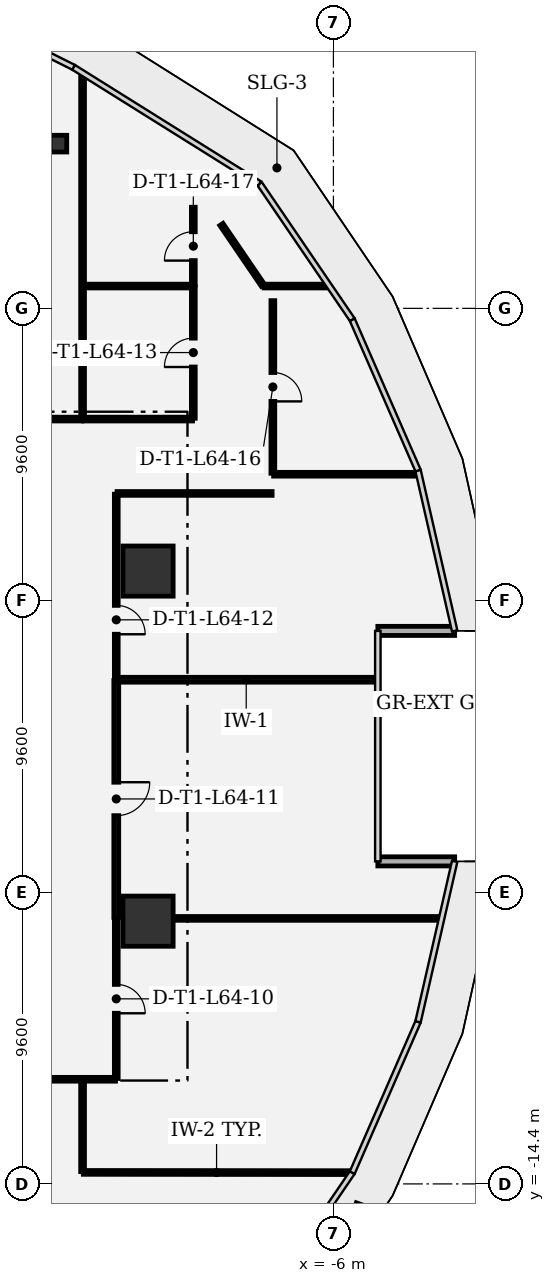
"""IFC4 building model, lengths in metres.
Left out: names, types, materials, properties, quantities, classifications, styles, units other than length and angle.
Written with IfcOpenShell. Run it as: python <this file> out.ifc"""

import sys

from ifc_helpers import new_model, si_unit, direction, frame, frame_2d, origin, origin_2d, place, context, subcontext, project, spatial, rectangle, extrude, element, fill, save


model = new_model("IFC4")
c1 = context("Model", 3, precision=1e-05, world=origin(), true_north=direction((0.0, 1.0)))
c2 = subcontext(c1, "Body", "Model", "MODEL_VIEW")
j1 = project(units=[si_unit("LENGTHUNIT", "METRE"), si_unit("PLANEANGLEUNIT", "RADIAN")], contexts=[c1])
p1 = place(None, origin())
s1 = spatial("IfcSite", under=j1, at=p1, CompositionType="ELEMENT")
p2 = place(p1, origin())
s2 = spatial("IfcBuilding", under=s1, at=p2, CompositionType="ELEMENT")
p3 = place(p2, frame((0.0, 0.0, 276.6)))
s3 = spatial("IfcBuildingStorey", under=s2, at=p3, CompositionType="ELEMENT", Elevation=276.6)
for number, where, z_axis, x_axis in (
    (1, (-12.097, -5.758, 0.0), (0.0, 0.0, 1.0), (1.0, 0.0, 0.0)),
    (2, (-12.097, 5.758, 0.0), (0.0, 0.0, 1.0), (1.0, 0.0, 0.0)),
):
    element("IfcColumn", number, at=place(p3, frame(where, z_axis=z_axis, x_axis=x_axis)), inside=s3, PredefinedType="COLUMN", context=c2, shape_type="SweptSolid", body=[
        extrude(rectangle(XDim=1.65, YDim=1.65, at=origin_2d()), origin(), (0.0, 0.0, 1.0), 4.2),
    ])
p4 = place(p3, frame((-15.046, 19.818, 0.0), z_axis=(0.0, 0.0, 1.0), x_axis=(1.0, 0.0, 0.0)))
e3 = element("IfcColumn", 3, at=p4, inside=s3, PredefinedType="COLUMN", context=c2, shape_type="SweptSolid", body=[
    extrude(rectangle(XDim=0.55, YDim=0.55, at=origin_2d()), origin(), (0.0, 0.0, 1.0), 4.2),
])
for number, where, z_axis, x_axis in (
    (4, (-2.011, -3.791, 0.0), (0.0, 0.0, 1.0), (-1.0, 0.0, 0.0)),
    (5, (-4.539, 3.791, 0.0), (0.0, 0.0, 1.0), (1.0, 0.0, 0.0)),
):
    element("IfcWall", number, at=place(p3, frame(where, z_axis=z_axis, x_axis=x_axis)), inside=s3, PredefinedType="SOLIDWALL", context=c2, shape_type="SweptSolid", body=[
        extrude(rectangle(XDim=2.527, YDim=0.3, at=frame_2d((1.264, 0.0))), origin(), (0.0, 0.0, 1.0), 3.91),
    ])
p5 = place(p3, frame((-14.225, -14.021, 0.0), z_axis=(0.0, 0.0, 1.0), x_axis=(0.999999627134, -0.000863557536, 0.0)))
e6 = element("IfcWall", 6, at=p5, inside=s3, PredefinedType="PARTITIONING", context=c2, shape_type="SweptSolid", body=[
    extrude(rectangle(XDim=8.764, YDim=0.125, at=frame_2d((4.382, 0.0))), origin(), (0.0, 0.0, 1.0), 3.91),
])
p6 = place(p3, frame((-14.25, -13.997, 0.0), z_axis=(0.0, 0.0, 1.0), x_axis=(0.0, 1.0, 0.0)))
e7 = element("IfcWall", 7, at=p6, inside=s3, PredefinedType="PARTITIONING", context=c2, shape_type="SweptSolid", body=[
    extrude(rectangle(XDim=3.014, YDim=0.125, at=frame_2d((1.507, 0.0))), origin(), (0.0, 0.0, 1.0), 3.13),
])
p7 = place(p3, frame((-38.384, -10.958, 0.0), z_axis=(0.0, 0.0, 1.0), x_axis=(1.0, 0.0, 0.0)))
e8 = element("IfcWall", 8, at=p7, inside=s3, PredefinedType="PARTITIONING", context=c2, shape_type="SweptSolid", body=[
    extrude(rectangle(XDim=24.109, YDim=0.125, at=frame_2d((12.055, 0.0))), origin(), (0.0, 0.0, 1.0), 3.13),
])
p8 = place(p7, frame((11.58, 0.0, 0.0)))
e9 = element("IfcOpeningElement", 9, at=p8, cuts=e8, PredefinedType="OPENING", context=c2, shape_type="SweptSolid", body=[
    extrude(rectangle(XDim=0.95, YDim=2.15, at=frame_2d((0.475, 1.075))), frame((0.0, 0.073, 0.0), z_axis=(0.0, -1.0, 0.0), x_axis=(1.0, 0.0, 0.0)), (0.0, 0.0, 1.0), 0.145),
])
p9 = place(p3, frame((-14.275, 10.758, 0.0), z_axis=(0.0, 0.0, 1.0), x_axis=(-1.0, 0.0, 0.0)))
e10 = element("IfcWall", 10, at=p9, inside=s3, PredefinedType="PARTITIONING", context=c2, shape_type="SweptSolid", body=[
    extrude(rectangle(XDim=23.473, YDim=0.125, at=frame_2d((11.736, 0.0))), origin(), (0.0, 0.0, 1.0), 3.13),
])
p10 = place(p3, frame((-14.25, 10.783, 0.0), z_axis=(0.0, 0.0, 1.0), x_axis=(0.0, 1.0, 0.0)))
e11 = element("IfcWall", 11, at=p10, inside=s3, PredefinedType="PARTITIONING", context=c2, shape_type="SweptSolid", body=[
    extrude(rectangle(XDim=11.28, YDim=0.125, at=frame_2d((5.64, 0.0))), origin(), (0.0, 0.0, 1.0), 3.13),
])
p11 = place(p3, frame((-2.52, -5.667, 0.0), z_axis=(0.0, 0.0, 1.0), x_axis=(-1.0, 0.0, 0.0)))
e12 = element("IfcWall", 12, at=p11, inside=s3, PredefinedType="PARTITIONING", context=c2, shape_type="SweptSolid", body=[
    extrude(rectangle(XDim=8.687, YDim=0.125, at=frame_2d((4.344, 0.0))), origin(), (0.0, 0.0, 1.0), 3.91),
])
p12 = place(p3, frame((-13.142, -5.692, 0.0), z_axis=(0.0, 0.0, 1.0), x_axis=(0.0, -1.0, 0.0)))
e13 = element("IfcWall", 13, at=p12, inside=s3, PredefinedType="PARTITIONING", context=c2, shape_type="SweptSolid", body=[
    extrude(rectangle(XDim=5.241, YDim=0.125, at=frame_2d((2.621, 0.0))), origin(), (0.0, 0.0, 1.0), 3.13),
])
p13 = place(p12, frame((2.146, 0.0, 0.0)))
e14 = element("IfcOpeningElement", 14, at=p13, cuts=e13, PredefinedType="OPENING", context=c2, shape_type="SweptSolid", body=[
    extrude(rectangle(XDim=0.95, YDim=2.15, at=frame_2d((0.475, 1.075))), frame((0.0, 0.073, 0.0), z_axis=(0.0, -1.0, 0.0), x_axis=(1.0, 0.0, 0.0)), (0.0, 0.0, 1.0), 0.145),
])
p14 = place(p3, frame((-14.217, -10.958, 0.0), z_axis=(0.0, 0.0, 1.0), x_axis=(1.0, 0.0, 0.0)))
e15 = element("IfcWall", 15, at=p14, inside=s3, PredefinedType="PARTITIONING", context=c2, shape_type="SweptSolid", body=[
    extrude(rectangle(XDim=1.05, YDim=0.125, at=frame_2d((0.525, 0.0))), origin(), (0.0, 0.0, 1.0), 3.91),
])
p15 = place(p3, frame((-4.619, 2.184, 0.0), z_axis=(0.0, 0.0, 1.0), x_axis=(-1.0, 0.0, 0.0)))
e16 = element("IfcWall", 16, at=p15, inside=s3, PredefinedType="PARTITIONING", context=c2, shape_type="SweptSolid", body=[
    extrude(rectangle(XDim=8.499, YDim=0.16, at=frame_2d((4.249, 0.0))), origin(), (0.0, 0.0, 1.0), 3.91),
])
p16 = place(p3, frame((-13.142, 2.159, 0.0), z_axis=(0.0, 0.0, 1.0), x_axis=(0.0, -1.0, 0.0)))
e17 = element("IfcWall", 17, at=p16, inside=s3, PredefinedType="PARTITIONING", context=c2, shape_type="SweptSolid", body=[
    extrude(rectangle(XDim=7.793, YDim=0.16, at=frame_2d((3.896, 0.0))), origin(), (0.0, 0.0, 1.0), 3.91),
])
p17 = place(p16, frame((3.346, 0.0, 0.0)))
e18 = element("IfcOpeningElement", 18, at=p17, cuts=e17, PredefinedType="OPENING", context=c2, shape_type="SweptSolid", body=[
    extrude(rectangle(XDim=1.1, YDim=2.15, at=frame_2d((0.55, 1.075))), frame((0.0, 0.09, 0.0), z_axis=(0.0, -1.0, 0.0), x_axis=(1.0, 0.0, 0.0)), (0.0, 0.0, 1.0), 0.18),
])
p18 = place(p3, frame((-3.268, 8.943, 0.0), z_axis=(0.0, 0.0, 1.0), x_axis=(-1.0, 0.0, 0.0)))
e19 = element("IfcWall", 19, at=p18, inside=s3, PredefinedType="PARTITIONING", context=c2, shape_type="SweptSolid", body=[
    extrude(rectangle(XDim=4.699, YDim=0.125, at=frame_2d((2.349, 0.0))), origin(), (0.0, 0.0, 1.0), 3.91),
])
p19 = place(p3, frame((-8.017, 8.312, 0.0), z_axis=(0.0, 0.0, 1.0), x_axis=(-1.0, 0.0, 0.0)))
e20 = element("IfcWall", 20, at=p19, inside=s3, PredefinedType="PARTITIONING", context=c2, shape_type="SweptSolid", body=[
    extrude(rectangle(XDim=5.1, YDim=0.125, at=frame_2d((2.55, 0.0))), origin(), (0.0, 0.0, 1.0), 3.91),
])
p20 = place(p3, frame((-13.142, 8.287, 0.0), z_axis=(0.0, 0.0, 1.0), x_axis=(0.0, -1.0, 0.0)))
e21 = element("IfcWall", 21, at=p20, inside=s3, PredefinedType="PARTITIONING", context=c2, shape_type="SweptSolid", body=[
    extrude(rectangle(XDim=6.07, YDim=0.125, at=frame_2d((3.035, 0.0))), origin(), (0.0, 0.0, 1.0), 3.13),
])
p21 = place(p20, frame((3.657, 0.0, 0.0)))
e22 = element("IfcOpeningElement", 22, at=p21, cuts=e21, PredefinedType="OPENING", context=c2, shape_type="SweptSolid", body=[
    extrude(rectangle(XDim=0.95, YDim=2.15, at=frame_2d((0.475, 1.075))), frame((0.0, 0.073, 0.0), z_axis=(0.0, -1.0, 0.0), x_axis=(1.0, 0.0, 0.0)), (0.0, 0.0, 1.0), 0.145),
])
p22 = place(p3, frame((-6.214, 15.134, 0.0), z_axis=(0.0, 0.0, 1.0), x_axis=(-1.0, 0.0, 0.0)))
e23 = element("IfcWall", 23, at=p22, inside=s3, PredefinedType="PARTITIONING", context=c2, shape_type="SweptSolid", body=[
    extrude(rectangle(XDim=2.064, YDim=0.125, at=frame_2d((1.032, 0.0))), origin(), (0.0, 0.0, 1.0), 3.91),
])
p23 = place(p3, frame((-7.992, 14.653, 0.0), z_axis=(0.0, 0.0, 1.0), x_axis=(0.0, -1.0, 0.0)))
e24 = element("IfcWall", 24, at=p23, inside=s3, PredefinedType="PARTITIONING", context=c2, shape_type="SweptSolid", body=[
    extrude(rectangle(XDim=5.677, YDim=0.125, at=frame_2d((2.838, 0.0))), origin(), (0.0, 0.0, 1.0), 3.91),
])
p24 = place(p23, frame((2.363, 0.0, 0.0)))
e25 = element("IfcOpeningElement", 25, at=p24, cuts=e24, PredefinedType="OPENING", context=c2, shape_type="SweptSolid", body=[
    extrude(rectangle(XDim=0.95, YDim=2.15, at=frame_2d((0.475, 1.075))), frame((0.0, 0.073, 0.0), z_axis=(0.0, -1.0, 0.0), x_axis=(1.0, 0.0, 0.0)), (0.0, 0.0, 1.0), 0.145),
])
p25 = place(p3, frame((-14.217, 10.758, 0.0), z_axis=(0.0, 0.0, 1.0), x_axis=(1.0, 0.0, 0.0)))
e26 = element("IfcWall", 26, at=p25, inside=s3, PredefinedType="PARTITIONING", context=c2, shape_type="SweptSolid", body=[
    extrude(rectangle(XDim=3.584, YDim=0.125, at=frame_2d((1.792, 0.0))), origin(), (0.0, 0.0, 1.0), 3.91),
])
p26 = place(p3, frame((-10.608, 10.783, 0.0), z_axis=(0.0, 0.0, 1.0), x_axis=(0.0, 1.0, 0.0)))
e27 = element("IfcWall", 27, at=p26, inside=s3, PredefinedType="PARTITIONING", context=c2, shape_type="SweptSolid", body=[
    extrude(rectangle(XDim=4.325, YDim=0.125, at=frame_2d((2.163, 0.0))), origin(), (0.0, 0.0, 1.0), 3.91),
])
p27 = place(p26, frame((1.688, 0.0, 0.0)))
e28 = element("IfcOpeningElement", 28, at=p27, cuts=e27, PredefinedType="OPENING", context=c2, shape_type="SweptSolid", body=[
    extrude(rectangle(XDim=0.95, YDim=2.15, at=frame_2d((0.475, 1.075))), frame((0.0, 0.073, 0.0), z_axis=(0.0, -1.0, 0.0), x_axis=(1.0, 0.0, 0.0)), (0.0, 0.0, 1.0), 0.145),
])
p28 = place(p3, frame((-10.633, 15.134, 0.0), z_axis=(0.0, 0.0, 1.0), x_axis=(-1.0, 0.0, 0.0)))
e29 = element("IfcWall", 29, at=p28, inside=s3, PredefinedType="PARTITIONING", context=c2, shape_type="SweptSolid", body=[
    extrude(rectangle(XDim=3.507, YDim=0.125, at=frame_2d((1.753, 0.0))), origin(), (0.0, 0.0, 1.0), 3.91),
])
p29 = place(p3, frame((-10.608, 15.167, 0.0), z_axis=(0.0, 0.0, 1.0), x_axis=(0.0, 1.0, 0.0)))
e30 = element("IfcWall", 30, at=p29, inside=s3, PredefinedType="PARTITIONING", context=c2, shape_type="SweptSolid", body=[
    extrude(rectangle(XDim=2.559, YDim=0.125, at=frame_2d((1.28, 0.0))), origin(), (0.0, 0.0, 1.0), 3.91),
])
p30 = place(p29, frame((0.804, 0.0, 0.0)))
e31 = element("IfcOpeningElement", 31, at=p30, cuts=e30, PredefinedType="OPENING", context=c2, shape_type="SweptSolid", body=[
    extrude(rectangle(XDim=0.95, YDim=2.15, at=frame_2d((0.475, 1.075))), frame((0.0, 0.073, 0.0), z_axis=(0.0, -1.0, 0.0), x_axis=(1.0, 0.0, 0.0)), (0.0, 0.0, 1.0), 0.145),
])
p31 = place(p3, frame((-8.322, 15.162, 0.0), z_axis=(0.0, 0.0, 1.0), x_axis=(-0.563220914523, 0.826306360525, 0.0)))
e32 = element("IfcWall", 32, at=p31, inside=s3, PredefinedType="PARTITIONING", context=c2, shape_type="SweptSolid", body=[
    extrude(rectangle(XDim=2.418, YDim=0.125, at=frame_2d((1.209, 0.0))), origin(), (0.0, 0.0, 1.0), 3.91),
])
p32 = place(p13, origin())
e33 = element("IfcDoor", 33, at=p32, inside=s3, OperationType="SINGLE_SWING_RIGHT", PredefinedType="DOOR", context=c2, shape_type="SweptSolid", body=[
    extrude(rectangle(XDim=0.95, YDim=2.15, at=frame_2d((0.475, 1.075))), frame((0.0, 0.025, 0.0), z_axis=(0.0, -1.0, 0.0), x_axis=(1.0, 0.0, 0.0)), (0.0, 0.0, 1.0), 0.05),
])
fill(e14, e33)
p33 = place(p17, origin())
e34 = element("IfcDoor", 34, at=p33, inside=s3, OperationType="SINGLE_SWING_LEFT", PredefinedType="DOOR", context=c2, shape_type="SweptSolid", body=[
    extrude(rectangle(XDim=1.1, YDim=2.15, at=frame_2d((0.55, 1.075))), frame((0.0, 0.025, 0.0), z_axis=(0.0, -1.0, 0.0), x_axis=(1.0, 0.0, 0.0)), (0.0, 0.0, 1.0), 0.05),
])
fill(e18, e34)
p34 = place(p21, origin())
e35 = element("IfcDoor", 35, at=p34, inside=s3, OperationType="SINGLE_SWING_RIGHT", PredefinedType="DOOR", context=c2, shape_type="SweptSolid", body=[
    extrude(rectangle(XDim=0.95, YDim=2.15, at=frame_2d((0.475, 1.075))), frame((0.0, 0.025, 0.0), z_axis=(0.0, -1.0, 0.0), x_axis=(1.0, 0.0, 0.0)), (0.0, 0.0, 1.0), 0.05),
])
fill(e22, e35)
p35 = place(p27, origin())
e36 = element("IfcDoor", 36, at=p35, inside=s3, OperationType="SINGLE_SWING_LEFT", PredefinedType="DOOR", context=c2, shape_type="SweptSolid", body=[
    extrude(rectangle(XDim=0.95, YDim=2.15, at=frame_2d((0.475, 1.075))), frame((0.0, 0.025, 0.0), z_axis=(0.0, -1.0, 0.0), x_axis=(1.0, 0.0, 0.0)), (0.0, 0.0, 1.0), 0.05),
])
fill(e28, e36)
p36 = place(p24, origin())
e37 = element("IfcDoor", 37, at=p36, inside=s3, OperationType="SINGLE_SWING_RIGHT", PredefinedType="DOOR", context=c2, shape_type="SweptSolid", body=[
    extrude(rectangle(XDim=0.95, YDim=2.15, at=frame_2d((0.475, 1.075))), frame((0.0, 0.025, 0.0), z_axis=(0.0, -1.0, 0.0), x_axis=(1.0, 0.0, 0.0)), (0.0, 0.0, 1.0), 0.05),
])
fill(e25, e37)
p37 = place(p30, origin())
e38 = element("IfcDoor", 38, at=p37, inside=s3, OperationType="SINGLE_SWING_LEFT", PredefinedType="DOOR", context=c2, shape_type="SweptSolid", body=[
    extrude(rectangle(XDim=0.95, YDim=2.15, at=frame_2d((0.475, 1.075))), frame((0.0, 0.025, 0.0), z_axis=(0.0, -1.0, 0.0), x_axis=(1.0, 0.0, 0.0)), (0.0, 0.0, 1.0), 0.05),
])
fill(e31, e38)
save(model, sys.argv[1])
